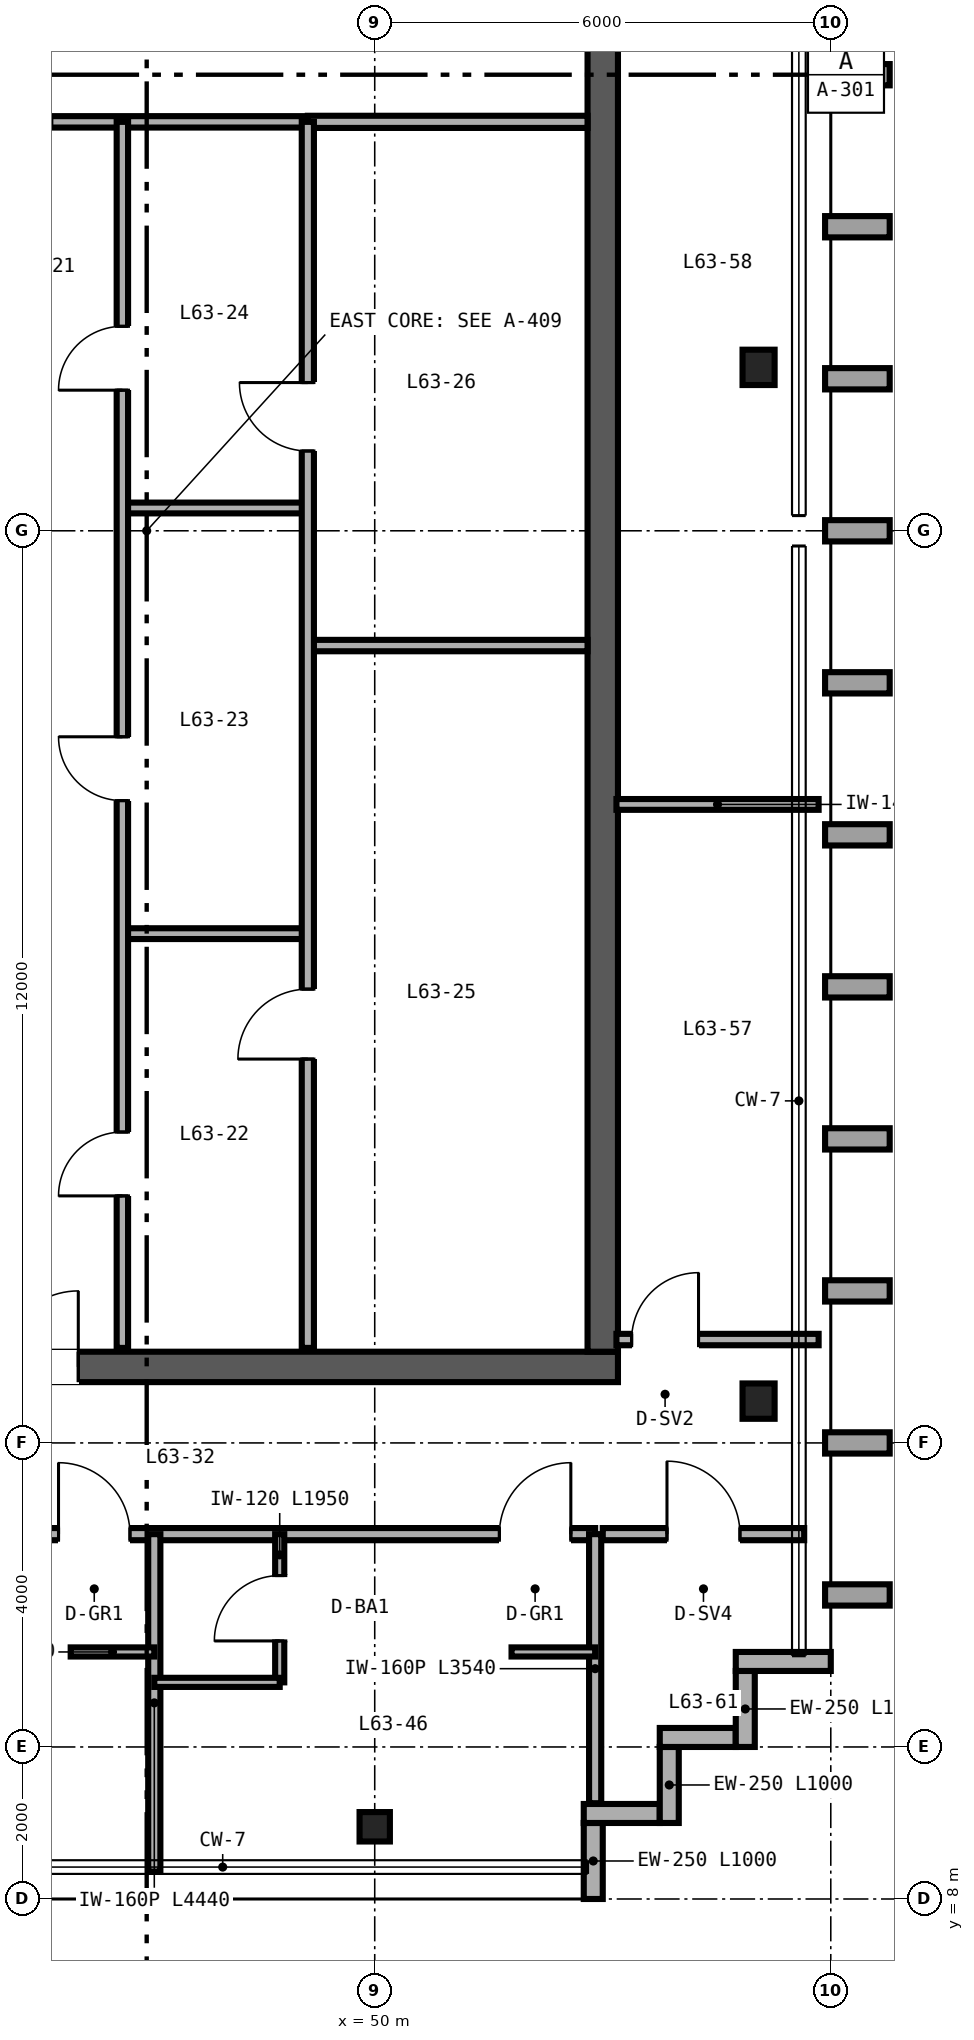
"""IFC4 building model, lengths in metres.
Left out: names, types, materials, properties, quantities, classifications, styles, units other than length and angle.
Written with IfcOpenShell. Run it as: python <this file> out.ifc"""

import sys

from ifc_helpers import new_model, si_unit, direction, frame, frame_2d, origin, origin_2d, place, context, subcontext, project, spatial, rectangle, i_section, extrude, source, transform, mapped, element, fill, save


model = new_model("IFC4")
c1 = context("Model", 3, precision=1e-05, world=origin(), true_north=direction((0.0, 1.0)))
c2 = subcontext(c1, "Body", "Model", "MODEL_VIEW")
j1 = project(units=[si_unit("LENGTHUNIT", "METRE"), si_unit("PLANEANGLEUNIT", "RADIAN")], contexts=[c1])
p1 = place(None, origin())
s1 = spatial("IfcSite", under=j1, at=p1, CompositionType="ELEMENT")
p2 = place(p1, origin())
s2 = spatial("IfcBuilding", under=s1, at=p2, CompositionType="ELEMENT")
p3 = place(p2, frame((0.0, 0.0, 250.8)))
s3 = spatial("IfcBuildingStorey", under=s2, at=p3, CompositionType="ELEMENT", Elevation=250.8)
p4 = place(p3, frame((40.8, 15.0, 0.0), z_axis=(0.0, 0.0, 1.0), x_axis=(1.0, 0.0, 0.0)))
e1 = element("IfcWall", 1, at=p4, inside=s3, PredefinedType="SHEAR", context=c2, shape_type="SweptSolid", body=[
    extrude(rectangle(XDim=12.4, YDim=0.4, at=frame_2d((6.2, 0.0))), origin(), (0.0, 0.0, 1.0), 3.38),
])
p5 = place(p4, frame((4.3, 0.0, 0.0)))
e2 = element("IfcOpeningElement", 2, at=p5, cuts=e1, PredefinedType="OPENING", context=c2, shape_type="SweptSolid", body=[
    extrude(rectangle(XDim=1.0, YDim=2.15, at=frame_2d((0.5, 1.075))), frame((0.0, 0.21, 0.0), z_axis=(0.0, -1.0, 0.0), x_axis=(1.0, 0.0, 0.0)), (0.0, 0.0, 1.0), 0.42),
])
p6 = place(p3, frame((53.0, 15.2, 0.0), z_axis=(0.0, 0.0, 1.0), x_axis=(0.0, 1.0, 0.0)))
e3 = element("IfcWall", 3, at=p6, inside=s3, PredefinedType="SHEAR", context=c2, shape_type="SweptSolid", body=[
    extrude(rectangle(XDim=21.6, YDim=0.4, at=frame_2d((10.8, 0.0))), origin(), (0.0, 0.0, 1.0), 3.38),
])
m1 = source(origin(), c2, "Body", "SweptSolid", [
    extrude(i_section(OverallWidth=0.422, OverallDepth=0.465, WebThickness=0.045, FlangeThickness=0.073, FilletRadius=0.025, at=origin_2d()), origin(), (0.0, 0.0, 1.0), 3.38),
])
for number, where, z_axis, x_axis in (
    (4, (55.05, 14.55, 0.0), (0.0, 0.0, 1.0), (1.0, 0.0, 0.0)),
    (5, (55.05, 28.15, 0.0), (0.0, 0.0, 1.0), (1.0, 0.0, 0.0)),
):
    element("IfcColumn", number, at=place(p3, frame(where, z_axis=z_axis, x_axis=x_axis)), inside=s3, PredefinedType="COLUMN", context=c2, shape_type="MappedRepresentation", body=[
        mapped(m1, transform((0.0, 0.0, 0.0), scale=1.0)),
    ])
m2 = source(origin(), c2, "Body", "SweptSolid", [
    extrude(i_section(OverallWidth=0.399, OverallDepth=0.387, WebThickness=0.021, FlangeThickness=0.033, FilletRadius=0.025, at=origin_2d()), origin(), (0.0, 0.0, 1.0), 3.38),
])
p7 = place(p3, frame((50.0, 8.95, 0.0), z_axis=(0.0, 0.0, 1.0), x_axis=(1.0, 0.0, 0.0)))
e6 = element("IfcColumn", 6, at=p7, inside=s3, PredefinedType="COLUMN", context=c2, shape_type="MappedRepresentation", body=[
    mapped(m2, transform((0.0, 0.0, 0.0), scale=1.0)),
])
for number, where, z_axis, x_axis in (
    (7, (52.875, 8.0, 0.0), (0.0, 0.0, 1.0), (0.0, 1.0, 0.0)),
    (8, (52.75, 9.125, 0.0), (0.0, 0.0, 1.0), (1.0, 0.0, 0.0)),
    (9, (53.875, 9.0, 0.0), (0.0, 0.0, 1.0), (0.0, 1.0, 0.0)),
    (10, (53.75, 10.125, 0.0), (0.0, 0.0, 1.0), (1.0, 0.0, 0.0)),
    (11, (54.875, 10.0, 0.0), (0.0, 0.0, 1.0), (0.0, 1.0, 0.0)),
):
    element("IfcWall", number, at=place(p3, frame(where, z_axis=z_axis, x_axis=x_axis)), inside=s3, PredefinedType="SOLIDWALL", context=c2, shape_type="SweptSolid", body=[
        extrude(rectangle(XDim=1.0, YDim=0.25, at=frame_2d((0.5, 0.0))), origin(), (0.0, 0.0, 1.0), 3.38),
    ])
p8 = place(p3, frame((54.75, 11.125, 0.0), z_axis=(0.0, 0.0, 1.0), x_axis=(1.0, 0.0, 0.0)))
e12 = element("IfcWall", 12, at=p8, inside=s3, PredefinedType="SOLIDWALL", context=c2, shape_type="SweptSolid", body=[
    extrude(rectangle(XDim=1.25, YDim=0.25, at=frame_2d((0.625, 0.0))), origin(), (0.0, 0.0, 1.0), 3.38),
])
p9 = place(p3, frame((41.25, 31.38, 0.0), z_axis=(0.0, 0.0, 1.0), x_axis=(1.0, 0.0, 0.0)))
e13 = element("IfcWall", 13, at=p9, inside=s3, PredefinedType="PARTITIONING", context=c2, shape_type="SweptSolid", body=[
    extrude(rectangle(XDim=7.87, YDim=0.15, at=frame_2d((3.935, 0.0))), origin(), (0.0, 0.0, 1.0), 2.48),
])
p10 = place(p9, frame((3.6, 0.0, 0.0)))
e14 = element("IfcOpeningElement", 14, at=p10, cuts=e13, PredefinedType="OPENING", context=c2, shape_type="SweptSolid", body=[
    extrude(rectangle(XDim=0.9, YDim=2.15, at=frame_2d((0.45, 1.075))), frame((0.0, 0.085, 0.0), z_axis=(0.0, -1.0, 0.0), x_axis=(1.0, 0.0, 0.0)), (0.0, 0.0, 1.0), 0.17),
])
for number, where, z_axis, x_axis in (
    (15, (46.68, 20.7, 0.0), (0.0, 0.0, 1.0), (1.0, 0.0, 0.0)),
    (16, (46.68, 26.3, 0.0), (0.0, 0.0, 1.0), (1.0, 0.0, 0.0)),
):
    element("IfcWall", number, at=place(p3, frame(where, z_axis=z_axis, x_axis=x_axis)), inside=s3, PredefinedType="PARTITIONING", context=c2, shape_type="SweptSolid", body=[
        extrude(rectangle(XDim=2.44, YDim=0.142, at=frame_2d((1.22, 0.0))), origin(), (0.0, 0.0, 1.0), 3.38),
    ])
p11 = place(p3, frame((46.68, 15.25, 0.0), z_axis=(0.0, 0.0, 1.0), x_axis=(0.0, 1.0, 0.0)))
e17 = element("IfcWall", 17, at=p11, inside=s3, PredefinedType="PARTITIONING", context=c2, shape_type="SweptSolid", body=[
    extrude(rectangle(XDim=16.13, YDim=0.15, at=frame_2d((8.065, 0.0))), origin(), (0.0, 0.0, 1.0), 2.453),
])
p12 = place(p11, frame((2.0, 0.0, 0.0)))
e18 = element("IfcOpeningElement", 18, at=p12, cuts=e17, PredefinedType="OPENING", context=c2, shape_type="SweptSolid", body=[
    extrude(rectangle(XDim=0.84, YDim=2.1, at=frame_2d((0.42, 1.05))), frame((0.0, 0.085, 0.0), z_axis=(0.0, -1.0, 0.0), x_axis=(1.0, 0.0, 0.0)), (0.0, 0.0, 1.0), 0.17),
])
p13 = place(p11, frame((7.2, 0.0, 0.0)))
e19 = element("IfcOpeningElement", 19, at=p13, cuts=e17, PredefinedType="OPENING", context=c2, shape_type="SweptSolid", body=[
    extrude(rectangle(XDim=0.84, YDim=2.1, at=frame_2d((0.42, 1.05))), frame((0.0, 0.085, 0.0), z_axis=(0.0, -1.0, 0.0), x_axis=(1.0, 0.0, 0.0)), (0.0, 0.0, 1.0), 0.17),
])
p14 = place(p11, frame((12.6, 0.0, 0.0)))
e20 = element("IfcOpeningElement", 20, at=p14, cuts=e17, PredefinedType="OPENING", context=c2, shape_type="SweptSolid", body=[
    extrude(rectangle(XDim=0.84, YDim=2.1, at=frame_2d((0.42, 1.05))), frame((0.0, 0.085, 0.0), z_axis=(0.0, -1.0, 0.0), x_axis=(1.0, 0.0, 0.0)), (0.0, 0.0, 1.0), 0.17),
])
p15 = place(p3, frame((49.12, 31.38, 0.0), z_axis=(0.0, 0.0, 1.0), x_axis=(1.0, 0.0, 0.0)))
e21 = element("IfcWall", 21, at=p15, inside=s3, PredefinedType="PARTITIONING", context=c2, shape_type="SweptSolid", body=[
    extrude(rectangle(XDim=3.68, YDim=0.16, at=frame_2d((1.84, 0.0))), origin(), (0.0, 0.0, 1.0), 2.48),
])
p16 = place(p3, frame((49.12, 24.49, 0.0), z_axis=(0.0, 0.0, 1.0), x_axis=(1.0, 0.0, 0.0)))
e22 = element("IfcWall", 22, at=p16, inside=s3, PredefinedType="PARTITIONING", context=c2, shape_type="SweptSolid", body=[
    extrude(rectangle(XDim=3.68, YDim=0.15, at=frame_2d((1.84, 0.0))), origin(), (0.0, 0.0, 1.0), 3.38),
])
p17 = place(p3, frame((49.12, 15.25, 0.0), z_axis=(0.0, 0.0, 1.0), x_axis=(0.0, 1.0, 0.0)))
e23 = element("IfcWall", 23, at=p17, inside=s3, PredefinedType="PARTITIONING", context=c2, shape_type="SweptSolid", body=[
    extrude(rectangle(XDim=16.13, YDim=0.16, at=frame_2d((8.065, 0.0))), origin(), (0.0, 0.0, 1.0), 2.453),
])
p18 = place(p17, frame((3.8, 0.0, 0.0)))
e24 = element("IfcOpeningElement", 24, at=p18, cuts=e23, PredefinedType="OPENING", context=c2, shape_type="SweptSolid", body=[
    extrude(rectangle(XDim=0.92, YDim=2.15, at=frame_2d((0.46, 1.075))), frame((0.0, 0.09, 0.0), z_axis=(0.0, -1.0, 0.0), x_axis=(1.0, 0.0, 0.0)), (0.0, 0.0, 1.0), 0.18),
])
p19 = place(p17, frame((11.8, 0.0, 0.0)))
e25 = element("IfcOpeningElement", 25, at=p19, cuts=e23, PredefinedType="OPENING", context=c2, shape_type="SweptSolid", body=[
    extrude(rectangle(XDim=0.9, YDim=2.15, at=frame_2d((0.45, 1.075))), frame((0.0, 0.09, 0.0), z_axis=(0.0, -1.0, 0.0), x_axis=(1.0, 0.0, 0.0)), (0.0, 0.0, 1.0), 0.18),
])
p20 = place(p3, frame((41.38, 12.8, 0.0), z_axis=(0.0, 0.0, 1.0), x_axis=(1.0, 0.0, 0.0)))
e26 = element("IfcWall", 26, at=p20, inside=s3, PredefinedType="PARTITIONING", context=c2, shape_type="SweptSolid", body=[
    extrude(rectangle(XDim=11.52, YDim=0.16, at=frame_2d((5.76, 0.0))), origin(), (0.0, 0.0, 1.0), 3.38),
])
p21 = place(p20, frame((4.46, 0.0, 0.0)))
e27 = element("IfcOpeningElement", 27, at=p21, cuts=e26, PredefinedType="OPENING", context=c2, shape_type="SweptSolid", body=[
    extrude(rectangle(XDim=0.94, YDim=2.15, at=frame_2d((0.47, 1.075))), frame((0.0, 0.09, 0.0), z_axis=(0.0, -1.0, 0.0), x_axis=(1.0, 0.0, 0.0)), (0.0, 0.0, 1.0), 0.18),
])
p22 = place(p20, frame((10.26, 0.0, 0.0)))
e28 = element("IfcOpeningElement", 28, at=p22, cuts=e26, PredefinedType="OPENING", context=c2, shape_type="SweptSolid", body=[
    extrude(rectangle(XDim=0.94, YDim=2.15, at=frame_2d((0.47, 1.075))), frame((0.0, 0.09, 0.0), z_axis=(0.0, -1.0, 0.0), x_axis=(1.0, 0.0, 0.0)), (0.0, 0.0, 1.0), 0.18),
])
p23 = place(p3, frame((52.9, 9.26, 0.0), z_axis=(0.0, 0.0, 1.0), x_axis=(0.0, 1.0, 0.0)))
e29 = element("IfcWall", 29, at=p23, inside=s3, PredefinedType="PARTITIONING", context=c2, shape_type="SweptSolid", body=[
    extrude(rectangle(XDim=3.54, YDim=0.16, at=frame_2d((1.77, 0.0))), origin(), (0.0, 0.0, 1.0), 3.38),
])
p24 = place(p3, frame((47.1, 8.36, 0.0), z_axis=(0.0, 0.0, 1.0), x_axis=(0.0, 1.0, 0.0)))
e30 = element("IfcWall", 30, at=p24, inside=s3, PredefinedType="PARTITIONING", context=c2, shape_type="SweptSolid", body=[
    extrude(rectangle(XDim=4.44, YDim=0.16, at=frame_2d((2.22, 0.0))), origin(), (0.0, 0.0, 1.0), 2.687),
])
p25 = place(p3, frame((46.0, 11.25, 0.0), z_axis=(0.0, 0.0, 1.0), x_axis=(1.0, 0.0, 0.0)))
e31 = element("IfcWall", 31, at=p25, inside=s3, PredefinedType="PARTITIONING", context=c2, shape_type="SweptSolid", body=[
    extrude(rectangle(XDim=1.1, YDim=0.12, at=frame_2d((0.55, 0.0))), origin(), (0.0, 0.0, 1.0), 3.38),
])
p26 = place(p3, frame((48.75, 10.85, 0.0), z_axis=(0.0, 0.0, 1.0), x_axis=(0.0, 1.0, 0.0)))
e32 = element("IfcWall", 32, at=p26, inside=s3, PredefinedType="PARTITIONING", context=c2, shape_type="SweptSolid", body=[
    extrude(rectangle(XDim=1.95, YDim=0.12, at=frame_2d((0.975, 0.0))), origin(), (0.0, 0.0, 1.0), 3.38),
])
p27 = place(p26, frame((0.545, 0.0, 0.0)))
e33 = element("IfcOpeningElement", 33, at=p27, cuts=e32, PredefinedType="OPENING", context=c2, shape_type="SweptSolid", body=[
    extrude(rectangle(XDim=0.86, YDim=2.1, at=frame_2d((0.43, 1.05))), frame((0.0, 0.07, 0.0), z_axis=(0.0, -1.0, 0.0), x_axis=(1.0, 0.0, 0.0)), (0.0, 0.0, 1.0), 0.14),
])
p28 = place(p3, frame((47.1, 10.85, 0.0), z_axis=(0.0, 0.0, 1.0), x_axis=(1.0, 0.0, 0.0)))
e34 = element("IfcWall", 34, at=p28, inside=s3, PredefinedType="PARTITIONING", context=c2, shape_type="SweptSolid", body=[
    extrude(rectangle(XDim=1.65, YDim=0.12, at=frame_2d((0.825, 0.0))), origin(), (0.0, 0.0, 1.0), 3.38),
])
p29 = place(p3, frame((51.8, 11.25, 0.0), z_axis=(0.0, 0.0, 1.0), x_axis=(1.0, 0.0, 0.0)))
e35 = element("IfcWall", 35, at=p29, inside=s3, PredefinedType="PARTITIONING", context=c2, shape_type="SweptSolid", body=[
    extrude(rectangle(XDim=1.1, YDim=0.12, at=frame_2d((0.55, 0.0))), origin(), (0.0, 0.0, 1.0), 3.38),
])
p30 = place(p3, frame((53.18, 15.36, 0.0), z_axis=(0.0, 0.0, 1.0), x_axis=(1.0, 0.0, 0.0)))
e36 = element("IfcWall", 36, at=p30, inside=s3, PredefinedType="PARTITIONING", context=c2, shape_type="SweptSolid", body=[
    extrude(rectangle(XDim=2.66, YDim=0.15, at=frame_2d((1.33, 0.0))), origin(), (0.0, 0.0, 1.0), 2.601),
])
p31 = place(p30, frame((0.2, 0.0, 0.0)))
e37 = element("IfcOpeningElement", 37, at=p31, cuts=e36, PredefinedType="OPENING", context=c2, shape_type="SweptSolid", body=[
    extrude(rectangle(XDim=0.88, YDim=2.15, at=frame_2d((0.44, 1.075))), frame((0.0, 0.085, 0.0), z_axis=(0.0, -1.0, 0.0), x_axis=(1.0, 0.0, 0.0)), (0.0, 0.0, 1.0), 0.17),
])
p32 = place(p3, frame((53.18, 22.4, 0.0), z_axis=(0.0, 0.0, 1.0), x_axis=(1.0, 0.0, 0.0)))
e38 = element("IfcWall", 38, at=p32, inside=s3, PredefinedType="PARTITIONING", context=c2, shape_type="SweptSolid", body=[
    extrude(rectangle(XDim=2.66, YDim=0.142, at=frame_2d((1.33, 0.0))), origin(), (0.0, 0.0, 1.0), 2.601),
])
p33 = place(p3, frame((53.0, 12.8, 0.0), z_axis=(0.0, 0.0, 1.0), x_axis=(1.0, 0.0, 0.0)))
e39 = element("IfcWall", 39, at=p33, inside=s3, PredefinedType="PARTITIONING", context=c2, shape_type="SweptSolid", body=[
    extrude(rectangle(XDim=2.65, YDim=0.16, at=frame_2d((1.325, 0.0))), origin(), (0.0, 0.0, 1.0), 3.38),
])
p34 = place(p33, frame((0.845, 0.0, 0.0)))
e40 = element("IfcOpeningElement", 40, at=p34, cuts=e39, PredefinedType="OPENING", context=c2, shape_type="SweptSolid", body=[
    extrude(rectangle(XDim=0.96, YDim=2.15, at=frame_2d((0.48, 1.075))), frame((0.0, 0.09, 0.0), z_axis=(0.0, -1.0, 0.0), x_axis=(1.0, 0.0, 0.0)), (0.0, 0.0, 1.0), 0.18),
])
m3 = source(origin(), c2, "Body", "SweptSolid", [
    extrude(rectangle(XDim=0.84, YDim=2.1, at=frame_2d((0.42, 1.05))), frame((0.0, 0.025, 0.0), z_axis=(0.0, -1.0, 0.0), x_axis=(1.0, 0.0, 0.0)), (0.0, 0.0, 1.0), 0.05),
])
p35 = place(p12, origin())
e41 = element("IfcDoor", 41, at=p35, inside=s3, OperationType="SINGLE_SWING_LEFT", PredefinedType="DOOR", context=c2, shape_type="MappedRepresentation", body=[
    mapped(m3, transform((0.0, 0.0, 0.0), scale=1.0)),
])
fill(e18, e41)
p36 = place(p13, origin())
e42 = element("IfcDoor", 42, at=p36, inside=s3, OperationType="SINGLE_SWING_RIGHT", PredefinedType="DOOR", context=c2, shape_type="MappedRepresentation", body=[
    mapped(m3, transform((0.0, 0.0, 0.0), scale=1.0)),
])
fill(e19, e42)
p37 = place(p14, origin())
e43 = element("IfcDoor", 43, at=p37, inside=s3, OperationType="SINGLE_SWING_LEFT", PredefinedType="DOOR", context=c2, shape_type="MappedRepresentation", body=[
    mapped(m3, transform((0.0, 0.0, 0.0), scale=1.0)),
])
fill(e20, e43)
m4 = source(origin(), c2, "Body", "SweptSolid", [
    extrude(rectangle(XDim=1.0, YDim=2.15, at=frame_2d((0.5, 1.075))), frame((0.0, 0.025, 0.0), z_axis=(0.0, -1.0, 0.0), x_axis=(1.0, 0.0, 0.0)), (0.0, 0.0, 1.0), 0.05),
])
p38 = place(p5, origin())
e44 = element("IfcDoor", 44, at=p38, inside=s3, OperationType="SINGLE_SWING_RIGHT", PredefinedType="DOOR", context=c2, shape_type="MappedRepresentation", body=[
    mapped(m4, transform((0.0, 0.0, 0.0), scale=1.0)),
])
fill(e2, e44)
m5 = source(origin(), c2, "Body", "SweptSolid", [
    extrude(rectangle(XDim=0.92, YDim=2.15, at=frame_2d((0.46, 1.075))), frame((0.0, 0.025, 0.0), z_axis=(0.0, -1.0, 0.0), x_axis=(1.0, 0.0, 0.0)), (0.0, 0.0, 1.0), 0.05),
])
p39 = place(p18, origin())
e45 = element("IfcDoor", 45, at=p39, inside=s3, OperationType="SINGLE_SWING_LEFT", PredefinedType="DOOR", context=c2, shape_type="MappedRepresentation", body=[
    mapped(m5, transform((0.0, 0.0, 0.0), scale=1.0)),
])
fill(e24, e45)
m6 = source(origin(), c2, "Body", "SweptSolid", [
    extrude(rectangle(XDim=0.9, YDim=2.15, at=frame_2d((0.45, 1.075))), frame((0.0, 0.025, 0.0), z_axis=(0.0, -1.0, 0.0), x_axis=(1.0, 0.0, 0.0)), (0.0, 0.0, 1.0), 0.05),
])
p40 = place(p19, origin())
e46 = element("IfcDoor", 46, at=p40, inside=s3, OperationType="SINGLE_SWING_RIGHT", PredefinedType="DOOR", context=c2, shape_type="MappedRepresentation", body=[
    mapped(m6, transform((0.0, 0.0, 0.0), scale=1.0)),
])
fill(e25, e46)
m7 = source(origin(), c2, "Body", "SweptSolid", [
    extrude(rectangle(XDim=0.86, YDim=2.1, at=frame_2d((0.43, 1.05))), frame((0.0, 0.025, 0.0), z_axis=(0.0, -1.0, 0.0), x_axis=(1.0, 0.0, 0.0)), (0.0, 0.0, 1.0), 0.05),
])
p41 = place(p27, origin())
e47 = element("IfcDoor", 47, at=p41, inside=s3, OperationType="SINGLE_SWING_LEFT", PredefinedType="DOOR", context=c2, shape_type="MappedRepresentation", body=[
    mapped(m7, transform((0.0, 0.0, 0.0), scale=1.0)),
])
fill(e33, e47)
m8 = source(origin(), c2, "Body", "SweptSolid", [
    extrude(rectangle(XDim=0.94, YDim=2.15, at=frame_2d((0.47, 1.075))), frame((0.0, 0.025, 0.0), z_axis=(0.0, -1.0, 0.0), x_axis=(1.0, 0.0, 0.0)), (0.0, 0.0, 1.0), 0.05),
])
p42 = place(p21, origin())
e48 = element("IfcDoor", 48, at=p42, inside=s3, OperationType="SINGLE_SWING_LEFT", PredefinedType="DOOR", context=c2, shape_type="MappedRepresentation", body=[
    mapped(m8, transform((0.0, 0.0, 0.0), scale=1.0)),
])
fill(e27, e48)
p43 = place(p22, origin())
e49 = element("IfcDoor", 49, at=p43, inside=s3, OperationType="SINGLE_SWING_RIGHT", PredefinedType="DOOR", context=c2, shape_type="MappedRepresentation", body=[
    mapped(m8, transform((0.0, 0.0, 0.0), scale=1.0)),
])
fill(e28, e49)
m9 = source(origin(), c2, "Body", "SweptSolid", [
    extrude(rectangle(XDim=0.88, YDim=2.15, at=frame_2d((0.44, 1.075))), frame((0.0, 0.025, 0.0), z_axis=(0.0, -1.0, 0.0), x_axis=(1.0, 0.0, 0.0)), (0.0, 0.0, 1.0), 0.05),
])
p44 = place(p31, origin())
e50 = element("IfcDoor", 50, at=p44, inside=s3, OperationType="SINGLE_SWING_RIGHT", PredefinedType="DOOR", context=c2, shape_type="MappedRepresentation", body=[
    mapped(m9, transform((0.0, 0.0, 0.0), scale=1.0)),
])
fill(e37, e50)
m10 = source(origin(), c2, "Body", "SweptSolid", [
    extrude(rectangle(XDim=0.96, YDim=2.15, at=frame_2d((0.48, 1.075))), frame((0.0, 0.025, 0.0), z_axis=(0.0, -1.0, 0.0), x_axis=(1.0, 0.0, 0.0)), (0.0, 0.0, 1.0), 0.05),
])
p45 = place(p34, origin())
e51 = element("IfcDoor", 51, at=p45, inside=s3, OperationType="SINGLE_SWING_LEFT", PredefinedType="DOOR", context=c2, shape_type="MappedRepresentation", body=[
    mapped(m10, transform((0.0, 0.0, 0.0), scale=1.0)),
])
fill(e40, e51)
save(model, sys.argv[1])
